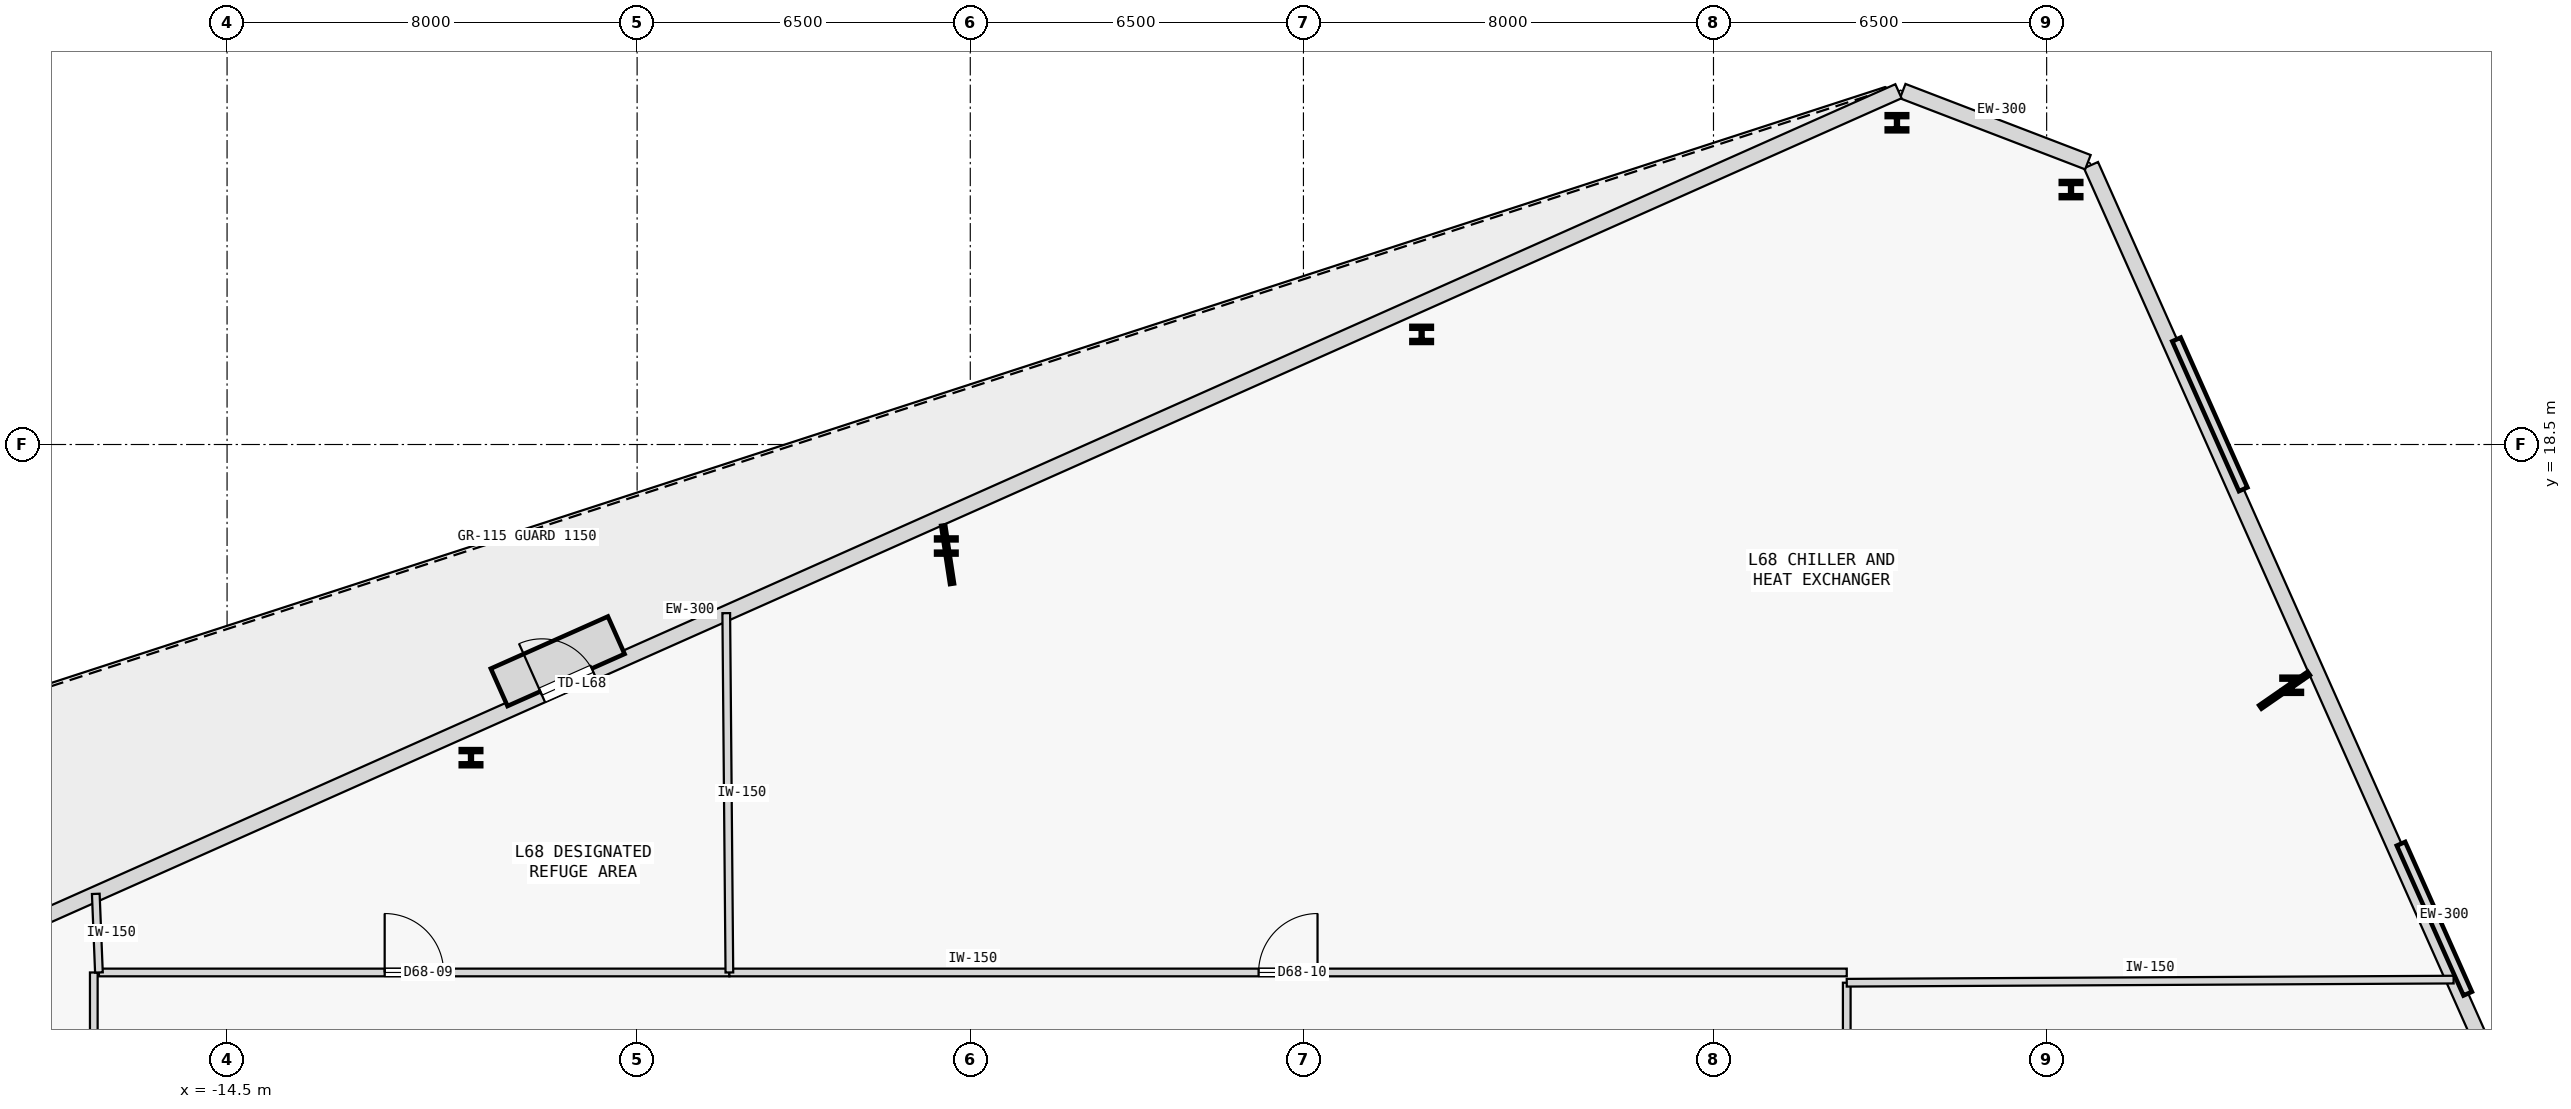
"""IFC4 building model, lengths in metres.
Left out: names, types, materials, properties, quantities, classifications, styles, units other than length and angle.
Written with IfcOpenShell. Run it as: python <this file> out.ifc"""

import sys

from ifc_helpers import new_model, si_unit, direction, frame, frame_2d, origin, origin_2d, place, context, subcontext, project, spatial, rectangle, i_section, extrude, element, fill, save


model = new_model("IFC4")
c1 = context("Model", 3, precision=1e-05, world=origin(), true_north=direction((0.0, 1.0)))
c2 = subcontext(c1, "Body", "Model", "MODEL_VIEW")
j1 = project(units=[si_unit("LENGTHUNIT", "METRE"), si_unit("PLANEANGLEUNIT", "RADIAN")], contexts=[c1])
p1 = place(None, origin())
s1 = spatial("IfcSite", under=j1, at=p1, CompositionType="ELEMENT")
p2 = place(p1, origin())
s2 = spatial("IfcBuilding", under=s1, at=p2, CompositionType="ELEMENT")
p3 = place(p2, frame((0.0, 0.0, 254.45)))
s3 = spatial("IfcBuildingStorey", under=s2, at=p3, CompositionType="ELEMENT", Elevation=254.45)
for number, where, z_axis, x_axis in (
    (1, (25.781, 13.803, 0.0), (0.0, 0.0, 1.0), (1.0, 0.0, 0.0)),
    (2, (21.476, 23.473, 0.0), (0.0, 0.0, 1.0), (1.0, 0.0, 0.0)),
    (3, (18.08, 24.777, 0.0), (0.0, 0.0, 1.0), (1.0, 0.0, 0.0)),
    (4, (8.806, 20.648, 0.0), (0.0, 0.0, 1.0), (1.0, 0.0, 0.0)),
    (5, (-0.468, 16.519, 0.0), (0.0, 0.0, 1.0), (1.0, 0.0, 0.0)),
    (6, (-9.741, 12.39, 0.0), (0.0, 0.0, 1.0), (1.0, 0.0, 0.0)),
):
    element("IfcColumn", number, at=place(p3, frame(where, z_axis=z_axis, x_axis=x_axis)), inside=s3, PredefinedType="COLUMN", context=c2, shape_type="SweptSolid", body=[
        extrude(i_section(OverallWidth=0.401, OverallDepth=0.335, WebThickness=0.036, FlangeThickness=0.058, FilletRadius=0.015, at=origin_2d()), origin(), (0.0, 0.0, 1.0), 4.4),
    ])
p4 = place(p3, frame((35.007, -5.566, 0.0), z_axis=(0.0, 0.0, 1.0), x_axis=(-0.406735709426, 0.91354587333, 0.0)))
e7 = element("IfcWall", 7, at=p4, inside=s3, PredefinedType="STANDARD", context=c2, shape_type="SweptSolid", body=[
    extrude(rectangle(XDim=32.31, YDim=0.3, at=frame_2d((16.155, 0.0))), origin(), (0.0, 0.0, 1.0), 4.175),
])
p5 = place(p3, frame((21.805, 24.008, 0.0), z_axis=(0.0, 0.0, 1.0), x_axis=(-0.933589291098, 0.358344855618, 0.0)))
e8 = element("IfcWall", 8, at=p5, inside=s3, PredefinedType="STANDARD", context=c2, shape_type="SweptSolid", body=[
    extrude(rectangle(XDim=3.87, YDim=0.3, at=frame_2d((1.935, 0.0))), origin(), (0.0, 0.0, 1.0), 4.175),
])
p6 = place(p3, frame((18.109, 25.392, 0.0), z_axis=(0.0, 0.0, 1.0), x_axis=(-0.913544894419, -0.406737908095, 0.0)))
e9 = element("IfcWall", 9, at=p6, inside=s3, PredefinedType="STANDARD", context=c2, shape_type="SweptSolid", body=[
    extrude(rectangle(XDim=51.31, YDim=0.3, at=frame_2d((25.655, 0.0))), origin(), (0.0, 0.0, 1.0), 4.175),
])
p7 = place(p6, frame((27.87, 0.0, 0.0)))
e10 = element("IfcOpeningElement", 10, at=p7, cuts=e9, PredefinedType="OPENING", context=c2, shape_type="SweptSolid", body=[
    extrude(rectangle(XDim=1.1, YDim=2.2, at=frame_2d((0.55, 1.1))), frame((0.0, 0.16, 0.0), z_axis=(0.0, -1.0, 0.0), x_axis=(1.0, 0.0, 0.0)), (0.0, 0.0, 1.0), 0.32),
])
p8 = place(p3, frame((-17.0, 8.2, 0.0), z_axis=(0.0, 0.0, 1.0), x_axis=(1.0, 0.0, 0.0)))
e11 = element("IfcWall", 11, at=p8, inside=s3, PredefinedType="PARTITIONING", context=c2, shape_type="SweptSolid", body=[
    extrude(rectangle(XDim=12.3, YDim=0.15, at=frame_2d((6.15, 0.0))), origin(), (0.0, 0.0, 1.0), 4.175),
])
p9 = place(p8, frame((5.575, 0.0, 0.0)))
e12 = element("IfcOpeningElement", 12, at=p9, cuts=e11, PredefinedType="OPENING", context=c2, shape_type="SweptSolid", body=[
    extrude(rectangle(XDim=1.15, YDim=2.15, at=frame_2d((0.575, 1.075))), frame((0.0, 0.085, 0.0), z_axis=(0.0, -1.0, 0.0), x_axis=(1.0, 0.0, 0.0)), (0.0, 0.0, 1.0), 0.17),
])
p10 = place(p3, frame((-4.7, 8.2, 0.0), z_axis=(0.0, 0.0, 1.0), x_axis=(1.0, 0.0, 0.0)))
e13 = element("IfcWall", 13, at=p10, inside=s3, PredefinedType="PARTITIONING", context=c2, shape_type="SweptSolid", body=[
    extrude(rectangle(XDim=21.8, YDim=0.15, at=frame_2d((10.9, 0.0))), origin(), (0.0, 0.0, 1.0), 4.175),
])
p11 = place(p10, frame((10.325, 0.0, 0.0)))
e14 = element("IfcOpeningElement", 14, at=p11, cuts=e13, PredefinedType="OPENING", context=c2, shape_type="SweptSolid", body=[
    extrude(rectangle(XDim=1.15, YDim=2.15, at=frame_2d((0.575, 1.075))), frame((0.0, 0.085, 0.0), z_axis=(0.0, -1.0, 0.0), x_axis=(1.0, 0.0, 0.0)), (0.0, 0.0, 1.0), 0.17),
])
p12 = place(p3, frame((-17.1, -8.2, 0.0), z_axis=(0.0, 0.0, 1.0), x_axis=(0.0, 1.0, 0.0)))
e15 = element("IfcWall", 15, at=p12, inside=s3, PredefinedType="PARTITIONING", context=c2, shape_type="SweptSolid", body=[
    extrude(rectangle(XDim=16.4, YDim=0.15, at=frame_2d((8.2, 0.0))), origin(), (0.0, 0.0, 1.0), 4.175),
])
p13 = place(p12, frame((5.165, 0.0, 0.0)))
e16 = element("IfcOpeningElement", 16, at=p13, cuts=e15, PredefinedType="OPENING", context=c2, shape_type="SweptSolid", body=[
    extrude(rectangle(XDim=1.15, YDim=2.15, at=frame_2d((0.575, 1.075))), frame((0.0, 0.085, 0.0), z_axis=(0.0, -1.0, 0.0), x_axis=(1.0, 0.0, 0.0)), (0.0, 0.0, 1.0), 0.17),
])
p14 = place(p3, frame((17.1, -8.0, 0.0), z_axis=(0.0, 0.0, 1.0), x_axis=(0.0, 1.0, 0.0)))
e17 = element("IfcWall", 17, at=p14, inside=s3, PredefinedType="PARTITIONING", context=c2, shape_type="SweptSolid", body=[
    extrude(rectangle(XDim=16.0, YDim=0.15, at=frame_2d((8.0, 0.0))), origin(), (0.0, 0.0, 1.0), 4.175),
])
p15 = place(p14, frame((5.025, 0.0, 0.0)))
e18 = element("IfcOpeningElement", 18, at=p15, cuts=e17, PredefinedType="OPENING", context=c2, shape_type="SweptSolid", body=[
    extrude(rectangle(XDim=1.15, YDim=2.15, at=frame_2d((0.575, 1.075))), frame((0.0, 0.085, 0.0), z_axis=(0.0, -1.0, 0.0), x_axis=(1.0, 0.0, 0.0)), (0.0, 0.0, 1.0), 0.17),
])
p16 = place(p3, frame((-4.7, 8.2, 0.0), z_axis=(0.0, 0.0, 1.0), x_axis=(-0.008706830723, 0.999962094831, 0.0)))
e19 = element("IfcWall", 19, at=p16, inside=s3, PredefinedType="PARTITIONING", context=c2, shape_type="SweptSolid", body=[
    extrude(rectangle(XDim=7.01, YDim=0.15, at=frame_2d((3.505, 0.0))), origin(), (0.0, 0.0, 1.0), 4.175),
])
p17 = place(p3, frame((-17.0, 8.2, 0.0), z_axis=(0.0, 0.0, 1.0), x_axis=(-0.039929919308, 0.999202482755, 0.0)))
e20 = element("IfcWall", 20, at=p17, inside=s3, PredefinedType="PARTITIONING", context=c2, shape_type="SweptSolid", body=[
    extrude(rectangle(XDim=1.535, YDim=0.15, at=frame_2d((0.767, 0.0))), origin(), (0.0, 0.0, 1.0), 4.175),
])
p18 = place(p3, frame((17.1, 8.0, 0.0), z_axis=(0.0, 0.0, 1.0), x_axis=(0.999986818459, 0.005134482272, 0.0)))
e21 = element("IfcWall", 21, at=p18, inside=s3, PredefinedType="PARTITIONING", context=c2, shape_type="SweptSolid", body=[
    extrude(rectangle(XDim=11.84, YDim=0.15, at=frame_2d((5.92, 0.0))), origin(), (0.0, 0.0, 1.0), 4.175),
])
p19 = place(p7, frame((1.1, 0.0, 0.0), z_axis=(0.0, 0.0, 1.0), x_axis=(-1.0, 0.0, 0.0)))
e22 = element("IfcDoor", 22, at=p19, inside=s3, OperationType="SINGLE_SWING_RIGHT", PredefinedType="DOOR", context=c2, shape_type="SweptSolid", body=[
    extrude(rectangle(XDim=1.1, YDim=2.2, at=frame_2d((0.55, 1.1))), frame((0.0, 0.025, 0.0), z_axis=(0.0, -1.0, 0.0), x_axis=(1.0, 0.0, 0.0)), (0.0, 0.0, 1.0), 0.05),
])
fill(e10, e22)
p20 = place(p9, origin())
e23 = element("IfcDoor", 23, at=p20, inside=s3, OperationType="SINGLE_SWING_LEFT", PredefinedType="DOOR", context=c2, shape_type="SweptSolid", body=[
    extrude(rectangle(XDim=1.15, YDim=2.15, at=frame_2d((0.575, 1.075))), frame((0.0, 0.025, 0.0), z_axis=(0.0, -1.0, 0.0), x_axis=(1.0, 0.0, 0.0)), (0.0, 0.0, 1.0), 0.05),
])
fill(e12, e23)
p21 = place(p11, origin())
e24 = element("IfcDoor", 24, at=p21, inside=s3, OperationType="SINGLE_SWING_RIGHT", PredefinedType="DOOR", context=c2, shape_type="SweptSolid", body=[
    extrude(rectangle(XDim=1.15, YDim=2.15, at=frame_2d((0.575, 1.075))), frame((0.0, 0.025, 0.0), z_axis=(0.0, -1.0, 0.0), x_axis=(1.0, 0.0, 0.0)), (0.0, 0.0, 1.0), 0.05),
])
fill(e14, e24)
save(model, sys.argv[1])
